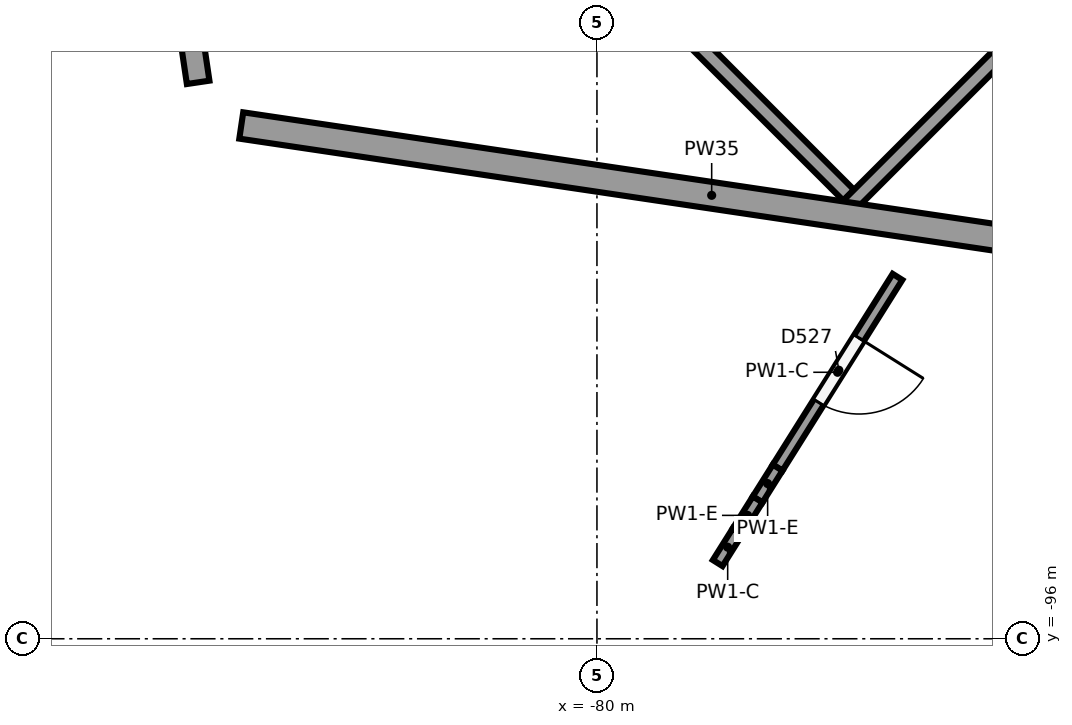
"""IFC4 building model, lengths in metres.
Left out: names, types, materials, properties, quantities, classifications, styles, units other than length and angle.
Written with IfcOpenShell. Run it as: python <this file> out.ifc"""

import sys

from ifc_helpers import new_model, si_unit, direction, frame, frame_2d, origin, origin_2d, place, context, subcontext, project, spatial, rectangle, circle, extrude, element, fill, save


model = new_model("IFC4")
c1 = context("Model", 3, precision=1e-05, world=origin(), true_north=direction((0.0, 1.0)))
c2 = subcontext(c1, "Body", "Model", "MODEL_VIEW")
j1 = project(units=[si_unit("LENGTHUNIT", "METRE"), si_unit("PLANEANGLEUNIT", "RADIAN")], contexts=[c1])
p1 = place(None, origin())
s1 = spatial("IfcSite", under=j1, at=p1, CompositionType="ELEMENT")
p2 = place(p1, origin())
s2 = spatial("IfcBuilding", under=s1, at=p2, CompositionType="ELEMENT")
p3 = place(p2, origin())
s3 = spatial("IfcBuildingStorey", under=s2, at=p3, CompositionType="ELEMENT", Elevation=0.0)
p4 = place(p3, frame((-85.174, -89.174, 0.0), z_axis=(0.0, 0.0, 1.0), x_axis=(1.0, 0.0, 0.0)))
e1 = element("IfcColumn", 1, at=p4, inside=s3, PredefinedType="COLUMN", context=c2, shape_type="SweptSolid", body=[
    extrude(circle(Radius=0.5, at=origin_2d()), origin(), (0.0, 0.0, 1.0), 6.5),
])
p5 = place(p3, frame((-87.427, -91.427, -0.3), z_axis=(0.0, 0.0, 1.0), x_axis=(1.0, 0.0, 0.0)))
e2 = element("IfcColumn", 2, at=p5, inside=s3, PredefinedType="COLUMN", context=c2, shape_type="SweptSolid", body=[
    extrude(circle(Radius=0.4, at=origin_2d()), origin(), (0.0, 0.0, 1.0), 6.8),
])
for number, where, z_axis, x_axis in (
    (3, (-82.719, -90.939, -0.3), (0.0, 0.0, 1.0), (1.0, 0.0, 0.0)),
    (4, (-74.836, -95.893, -0.3), (0.0, 0.0, 1.0), (1.0, 0.0, 0.0)),
    (5, (-84.463, -93.15, -0.3), (0.0, 0.0, 1.0), (1.0, 0.0, 0.0)),
    (6, (-80.394, -95.707, -0.3), (0.0, 0.0, 1.0), (1.0, 0.0, 0.0)),
    (7, (-86.494, -95.181, -0.3), (0.0, 0.0, 1.0), (1.0, 0.0, 0.0)),
):
    element("IfcColumn", number, at=place(p3, frame(where, z_axis=z_axis, x_axis=x_axis)), inside=s3, PredefinedType="COLUMN", context=c2, shape_type="SweptSolid", body=[
        extrude(circle(Radius=0.3, at=origin_2d()), origin(), (0.0, 0.0, 1.0), 6.8),
    ])
p6 = place(p3, frame((-85.247, -88.68, 0.0), z_axis=(0.0, 0.0, 1.0), x_axis=(-0.14684632149, 0.989159318747, 0.0)))
e8 = element("IfcWall", 8, at=p6, inside=s3, PredefinedType="SOLIDWALL", context=c2, shape_type="SweptSolid", body=[
    extrude(rectangle(XDim=12.514, YDim=0.3, at=frame_2d((6.257, 0.0))), origin(), (0.0, 0.0, 1.0), 4.85),
])
p7 = place(p3, frame((-72.301, -91.085, 0.0), z_axis=(0.0, 0.0, 1.0), x_axis=(-0.989159318747, 0.14684632149, 0.0)))
e9 = element("IfcWall", 9, at=p7, inside=s3, PredefinedType="SOLIDWALL", context=c2, shape_type="SweptSolid", body=[
    extrude(rectangle(XDim=12.514, YDim=0.35, at=frame_2d((6.257, 0.0))), origin(), (0.0, 0.0, 1.0), 4.85),
])
p8 = place(p3, frame((-76.688, -90.305, 0.0), z_axis=(0.0, 0.0, 1.0), x_axis=(0.707106781187, 0.707106781187, 0.0)))
e10 = element("IfcWall", 10, at=p8, inside=s3, PredefinedType="SHEAR", context=c2, shape_type="SweptSolid", body=[
    extrude(rectangle(XDim=9.8, YDim=0.2, at=frame_2d((4.9, 0.0))), origin(), (0.0, 0.0, 1.0), 6.15),
])
p9 = place(p3, frame((-81.355, -85.497, 0.0), z_axis=(0.0, 0.0, 1.0), x_axis=(0.707088285305, -0.707125276584, 0.0)))
e11 = element("IfcWall", 11, at=p9, inside=s3, PredefinedType="SHEAR", context=c2, shape_type="SweptSolid", body=[
    extrude(rectangle(XDim=6.6, YDim=0.2, at=frame_2d((3.3, 0.0))), origin(), (0.0, 0.0, 1.0), 6.15),
])
p10 = place(p3, frame((-76.046, -91.239, 0.0), z_axis=(0.0, 0.0, 1.0), x_axis=(-0.531974180768, -0.846760574776, 0.0)))
e12 = element("IfcWall", 12, at=p10, inside=s3, PredefinedType="PARTITIONING", context=c2, shape_type="SweptSolid", body=[
    extrude(rectangle(XDim=2.964, YDim=0.15, at=frame_2d((1.482, 0.0))), origin(), (0.0, 0.0, 1.0), 6.05),
])
p11 = place(p10, frame((0.95, 0.0, 0.0)))
e13 = element("IfcOpeningElement", 13, at=p11, cuts=e12, PredefinedType="OPENING", context=c2, shape_type="SweptSolid", body=[
    extrude(rectangle(XDim=1.0, YDim=2.1, at=frame_2d((0.5, 1.05))), frame((0.0, 0.085, 0.0), z_axis=(0.0, -1.0, 0.0), x_axis=(1.0, 0.0, 0.0)), (0.0, 0.0, 1.0), 0.17),
])
p12 = place(p3, frame((-77.623, -93.749, 0.0), z_axis=(0.0, 0.0, 1.0), x_axis=(-0.532040016941, -0.846719209876, 0.0)))
e14 = element("IfcWall", 14, at=p12, inside=s3, PredefinedType="PARTITIONING", context=c2, shape_type="SweptSolid", body=[
    extrude(rectangle(XDim=0.494, YDim=0.15, at=frame_2d((0.247, 0.0))), origin(), (0.0, 0.0, 1.0), 5.25),
])
p13 = place(p3, frame((-77.886, -94.167, 0.0), z_axis=(0.0, 0.0, 1.0), x_axis=(-0.53226263383, -0.846579286676, 0.0)))
e15 = element("IfcWall", 15, at=p13, inside=s3, PredefinedType="PARTITIONING", context=c2, shape_type="SweptSolid", body=[
    extrude(rectangle(XDim=0.494, YDim=0.15, at=frame_2d((0.247, 0.0))), origin(), (0.0, 0.0, 1.0), 5.25),
])
p14 = place(p3, frame((-78.149, -94.586, 0.0), z_axis=(0.0, 0.0, 1.0), x_axis=(-0.532040016941, -0.846719209876, 0.0)))
e16 = element("IfcWall", 16, at=p14, inside=s3, PredefinedType="PARTITIONING", context=c2, shape_type="SweptSolid", body=[
    extrude(rectangle(XDim=0.494, YDim=0.15, at=frame_2d((0.247, 0.0))), origin(), (0.0, 0.0, 1.0), 6.05),
])
p15 = place(p11, origin())
e17 = element("IfcDoor", 17, at=p15, inside=s3, OperationType="SINGLE_SWING_LEFT", PredefinedType="DOOR", context=c2, shape_type="SweptSolid", body=[
    extrude(rectangle(XDim=1.0, YDim=2.1, at=frame_2d((0.5, 1.05))), frame((0.0, 0.025, 0.0), z_axis=(0.0, -1.0, 0.0), x_axis=(1.0, 0.0, 0.0)), (0.0, 0.0, 1.0), 0.05),
])
fill(e13, e17)
save(model, sys.argv[1])
